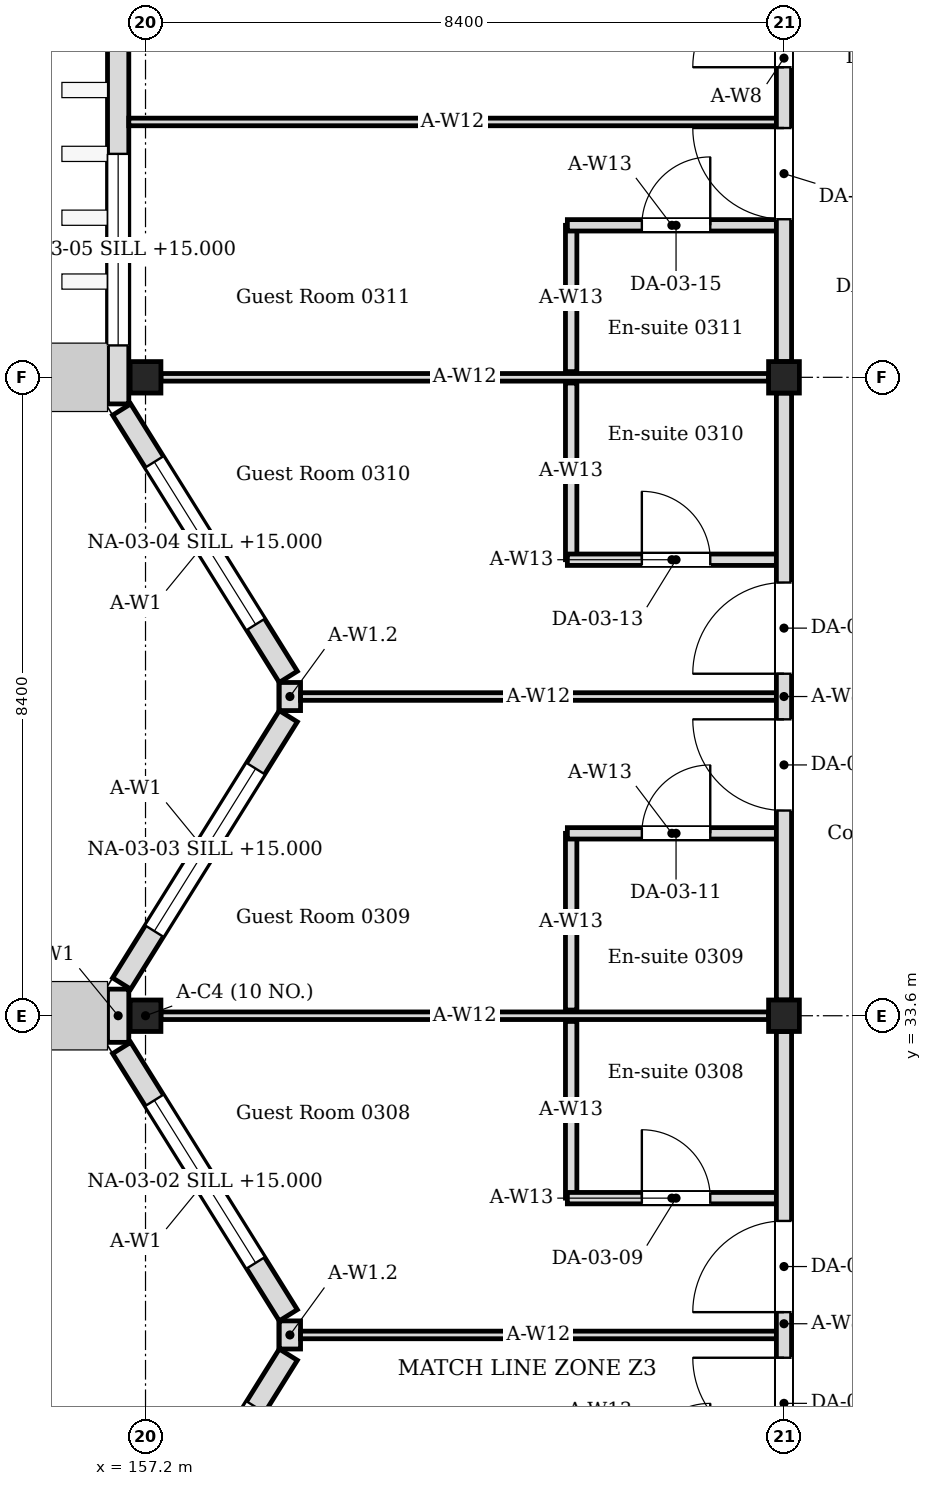
"""IFC4 building model, lengths in metres.
Left out: names, types, materials, properties, quantities, classifications, styles, units other than length and angle.
Written with IfcOpenShell. Run it as: python <this file> out.ifc"""

import sys

from ifc_helpers import new_model, si_unit, direction, frame, frame_2d, origin, origin_2d, place, context, subcontext, project, spatial, rectangle, i_section, extrude, element, fill, save


model = new_model("IFC4")
c1 = context("Model", 3, precision=1e-05, world=origin(), true_north=direction((0.0, 1.0)))
c2 = subcontext(c1, "Body", "Model", "MODEL_VIEW")
j1 = project(units=[si_unit("LENGTHUNIT", "METRE"), si_unit("PLANEANGLEUNIT", "RADIAN")], contexts=[c1])
p1 = place(None, origin())
s1 = spatial("IfcSite", under=j1, at=p1, CompositionType="ELEMENT")
p2 = place(p1, origin())
s2 = spatial("IfcBuilding", under=s1, at=p2, CompositionType="ELEMENT")
p3 = place(p2, frame((0.0, 0.0, 14.4)))
s3 = spatial("IfcBuildingStorey", under=s2, at=p3, CompositionType="ELEMENT", Elevation=14.4)
for number, where, z_axis, x_axis in (
    (1, (157.2, 33.6, 0.0), (0.0, 0.0, 1.0), (1.0, 0.0, 0.0)),
    (2, (157.2, 42.0, 0.0), (0.0, 0.0, 1.0), (1.0, 0.0, 0.0)),
    (3, (165.6, 33.6, 0.0), (0.0, 0.0, 1.0), (1.0, 0.0, 0.0)),
    (4, (165.6, 42.0, 0.0), (0.0, 0.0, 1.0), (1.0, 0.0, 0.0)),
):
    element("IfcColumn", number, at=place(p3, frame(where, z_axis=z_axis, x_axis=x_axis)), inside=s3, PredefinedType="COLUMN", context=c2, shape_type="SweptSolid", body=[
        extrude(i_section(OverallWidth=0.405, OverallDepth=0.414, WebThickness=0.018, FlangeThickness=0.028, FilletRadius=0.022, at=origin_2d()), origin(), (0.0, 0.0, 1.0), 4.2),
    ])
p4 = place(p3, frame((156.886, 25.624, 0.0), z_axis=(0.0, 0.0, 1.0), x_axis=(0.528992500338, 0.848626498871, 0.0)))
e5 = element("IfcWall", 5, at=p4, inside=s3, PredefinedType="SOLIDWALL", context=c2, shape_type="SweptSolid", body=[
    extrude(rectangle(XDim=4.145, YDim=0.28, at=frame_2d((2.072, 0.0))), origin(), (0.0, 0.0, 1.0), 4.05),
])
p5 = place(p4, frame((0.812, 0.0, 0.6)))
e6 = element("IfcOpeningElement", 6, at=p5, cuts=e5, PredefinedType="OPENING", context=c2, shape_type="SweptSolid", body=[
    extrude(rectangle(XDim=2.52, YDim=2.4, at=frame_2d((1.26, 1.2))), frame((0.0, 0.15, 0.0), z_axis=(0.0, -1.0, 0.0), x_axis=(1.0, 0.0, 0.0)), (0.0, 0.0, 1.0), 0.3),
])
p6 = place(p3, frame((159.079, 29.659, 0.0), z_axis=(0.0, 0.0, 1.0), x_axis=(-0.529018946142, 0.848610013271, 0.0)))
e7 = element("IfcWall", 7, at=p6, inside=s3, PredefinedType="SOLIDWALL", context=c2, shape_type="SweptSolid", body=[
    extrude(rectangle(XDim=4.144, YDim=0.28, at=frame_2d((2.072, 0.0))), origin(), (0.0, 0.0, 1.0), 4.05),
])
p7 = place(p6, frame((0.812, 0.0, 0.6)))
e8 = element("IfcOpeningElement", 8, at=p7, cuts=e7, PredefinedType="OPENING", context=c2, shape_type="SweptSolid", body=[
    extrude(rectangle(XDim=2.52, YDim=2.4, at=frame_2d((1.26, 1.2))), frame((0.0, 0.15, 0.0), z_axis=(0.0, -1.0, 0.0), x_axis=(1.0, 0.0, 0.0)), (0.0, 0.0, 1.0), 0.3),
])
p8 = place(p3, frame((159.1, 29.215, 0.0), z_axis=(0.0, 0.0, 1.0), x_axis=(0.0, 1.0, 0.0)))
e9 = element("IfcWall", 9, at=p8, inside=s3, PredefinedType="SOLIDWALL", context=c2, shape_type="SweptSolid", body=[
    extrude(rectangle(XDim=0.37, YDim=0.28, at=frame_2d((0.185, 0.0))), origin(), (0.0, 0.0, 1.0), 3.604),
])
p9 = place(p3, frame((156.84, 33.25, 0.0), z_axis=(0.0, 0.0, 1.0), x_axis=(0.0, 1.0, 0.0)))
e10 = element("IfcWall", 10, at=p9, inside=s3, PredefinedType="SOLIDWALL", context=c2, shape_type="SweptSolid", body=[
    extrude(rectangle(XDim=0.7, YDim=0.28, at=frame_2d((0.35, 0.0))), origin(), (0.0, 0.0, 1.0), 4.05),
])
p10 = place(p3, frame((156.886, 34.024, 0.0), z_axis=(0.0, 0.0, 1.0), x_axis=(0.529018946142, 0.848610013271, 0.0)))
e11 = element("IfcWall", 11, at=p10, inside=s3, PredefinedType="SOLIDWALL", context=c2, shape_type="SweptSolid", body=[
    extrude(rectangle(XDim=4.144, YDim=0.28, at=frame_2d((2.072, 0.0))), origin(), (0.0, 0.0, 1.0), 4.05),
])
p11 = place(p10, frame((0.812, 0.0, 0.6)))
e12 = element("IfcOpeningElement", 12, at=p11, cuts=e11, PredefinedType="OPENING", context=c2, shape_type="SweptSolid", body=[
    extrude(rectangle(XDim=2.52, YDim=2.4, at=frame_2d((1.26, 1.2))), frame((0.0, 0.15, 0.0), z_axis=(0.0, -1.0, 0.0), x_axis=(1.0, 0.0, 0.0)), (0.0, 0.0, 1.0), 0.3),
])
p12 = place(p3, frame((159.079, 38.059, 0.0), z_axis=(0.0, 0.0, 1.0), x_axis=(-0.529018946142, 0.848610013271, 0.0)))
e13 = element("IfcWall", 13, at=p12, inside=s3, PredefinedType="SOLIDWALL", context=c2, shape_type="SweptSolid", body=[
    extrude(rectangle(XDim=4.144, YDim=0.28, at=frame_2d((2.072, 0.0))), origin(), (0.0, 0.0, 1.0), 4.05),
])
p13 = place(p12, frame((0.812, 0.0, 0.6)))
e14 = element("IfcOpeningElement", 14, at=p13, cuts=e13, PredefinedType="OPENING", context=c2, shape_type="SweptSolid", body=[
    extrude(rectangle(XDim=2.52, YDim=2.4, at=frame_2d((1.26, 1.2))), frame((0.0, 0.15, 0.0), z_axis=(0.0, -1.0, 0.0), x_axis=(1.0, 0.0, 0.0)), (0.0, 0.0, 1.0), 0.3),
])
p14 = place(p3, frame((159.1, 37.615, 0.0), z_axis=(0.0, 0.0, 1.0), x_axis=(0.0, 1.0, 0.0)))
e15 = element("IfcWall", 15, at=p14, inside=s3, PredefinedType="SOLIDWALL", context=c2, shape_type="SweptSolid", body=[
    extrude(rectangle(XDim=0.37, YDim=0.28, at=frame_2d((0.185, 0.0))), origin(), (0.0, 0.0, 1.0), 3.604),
])
p15 = place(p3, frame((156.84, 41.65, 0.0), z_axis=(0.0, 0.0, 1.0), x_axis=(0.0, 1.0, 0.0)))
e16 = element("IfcWall", 16, at=p15, inside=s3, PredefinedType="SOLIDWALL", context=c2, shape_type="SweptSolid", body=[
    extrude(rectangle(XDim=17.5, YDim=0.28, at=frame_2d((8.75, 0.0))), origin(), (0.0, 0.0, 1.0), 4.05),
])
p16 = place(p15, frame((0.77, 0.0, 0.6)))
e17 = element("IfcOpeningElement", 17, at=p16, cuts=e16, PredefinedType="OPENING", context=c2, shape_type="SweptSolid", body=[
    extrude(rectangle(XDim=2.52, YDim=2.4, at=frame_2d((1.26, 1.2))), frame((0.0, 0.15, 0.0), z_axis=(0.0, -1.0, 0.0), x_axis=(1.0, 0.0, 0.0)), (0.0, 0.0, 1.0), 0.3),
])
p17 = place(p15, frame((4.97, 0.0, 0.6)))
e18 = element("IfcOpeningElement", 18, at=p17, cuts=e16, PredefinedType="OPENING", context=c2, shape_type="SweptSolid", body=[
    extrude(rectangle(XDim=2.52, YDim=2.4, at=frame_2d((1.26, 1.2))), frame((0.0, 0.15, 0.0), z_axis=(0.0, -1.0, 0.0), x_axis=(1.0, 0.0, 0.0)), (0.0, 0.0, 1.0), 0.3),
])
p18 = place(p15, frame((9.59, 0.0, 0.6)))
e19 = element("IfcOpeningElement", 19, at=p18, cuts=e16, PredefinedType="OPENING", context=c2, shape_type="SweptSolid", body=[
    extrude(rectangle(XDim=2.52, YDim=2.4, at=frame_2d((1.26, 1.2))), frame((0.0, 0.15, 0.0), z_axis=(0.0, -1.0, 0.0), x_axis=(1.0, 0.0, 0.0)), (0.0, 0.0, 1.0), 0.3),
])
p19 = place(p15, frame((13.79, 0.0, 0.6)))
e20 = element("IfcOpeningElement", 20, at=p19, cuts=e16, PredefinedType="OPENING", context=c2, shape_type="SweptSolid", body=[
    extrude(rectangle(XDim=2.52, YDim=2.4, at=frame_2d((1.26, 1.2))), frame((0.0, 0.15, 0.0), z_axis=(0.0, -1.0, 0.0), x_axis=(1.0, 0.0, 0.0)), (0.0, 0.0, 1.0), 0.3),
])
p20 = place(p3, frame((162.8, 31.2, 0.0), z_axis=(0.0, 0.0, 1.0), x_axis=(0.0, 1.0, 0.0)))
e21 = element("IfcWall", 21, at=p20, inside=s3, PredefinedType="PARTITIONING", context=c2, shape_type="SweptSolid", body=[
    extrude(rectangle(XDim=2.325, YDim=0.15, at=frame_2d((1.163, 0.0))), origin(), (0.0, 0.0, 1.0), 4.05),
])
p21 = place(p3, frame((162.75, 31.2, 0.0), z_axis=(0.0, 0.0, 1.0), x_axis=(1.0, 0.0, 0.0)))
e22 = element("IfcWall", 22, at=p21, inside=s3, PredefinedType="PARTITIONING", context=c2, shape_type="SweptSolid", body=[
    extrude(rectangle(XDim=2.75, YDim=0.15, at=frame_2d((1.375, 0.0))), origin(), (0.0, 0.0, 1.0), 4.05),
])
p22 = place(p21, frame((0.98, 0.0, 0.0)))
e23 = element("IfcOpeningElement", 23, at=p22, cuts=e22, PredefinedType="OPENING", context=c2, shape_type="SweptSolid", body=[
    extrude(rectangle(XDim=0.9, YDim=2.1, at=frame_2d((0.45, 1.05))), frame((0.0, 0.085, 0.0), z_axis=(0.0, -1.0, 0.0), x_axis=(1.0, 0.0, 0.0)), (0.0, 0.0, 1.0), 0.17),
])
p23 = place(p3, frame((162.8, 33.675, 0.0), z_axis=(0.0, 0.0, 1.0), x_axis=(0.0, 1.0, 0.0)))
e24 = element("IfcWall", 24, at=p23, inside=s3, PredefinedType="PARTITIONING", context=c2, shape_type="SweptSolid", body=[
    extrude(rectangle(XDim=2.325, YDim=0.15, at=frame_2d((1.163, 0.0))), origin(), (0.0, 0.0, 1.0), 4.05),
])
p24 = place(p3, frame((162.75, 36.0, 0.0), z_axis=(0.0, 0.0, 1.0), x_axis=(1.0, 0.0, 0.0)))
e25 = element("IfcWall", 25, at=p24, inside=s3, PredefinedType="PARTITIONING", context=c2, shape_type="SweptSolid", body=[
    extrude(rectangle(XDim=2.75, YDim=0.15, at=frame_2d((1.375, 0.0))), origin(), (0.0, 0.0, 1.0), 4.05),
])
p25 = place(p24, frame((0.98, 0.0, 0.0)))
e26 = element("IfcOpeningElement", 26, at=p25, cuts=e25, PredefinedType="OPENING", context=c2, shape_type="SweptSolid", body=[
    extrude(rectangle(XDim=0.9, YDim=2.1, at=frame_2d((0.45, 1.05))), frame((0.0, 0.085, 0.0), z_axis=(0.0, -1.0, 0.0), x_axis=(1.0, 0.0, 0.0)), (0.0, 0.0, 1.0), 0.17),
])
p26 = place(p3, frame((162.8, 39.6, 0.0), z_axis=(0.0, 0.0, 1.0), x_axis=(0.0, 1.0, 0.0)))
e27 = element("IfcWall", 27, at=p26, inside=s3, PredefinedType="PARTITIONING", context=c2, shape_type="SweptSolid", body=[
    extrude(rectangle(XDim=2.325, YDim=0.15, at=frame_2d((1.163, 0.0))), origin(), (0.0, 0.0, 1.0), 4.05),
])
p27 = place(p3, frame((162.75, 39.6, 0.0), z_axis=(0.0, 0.0, 1.0), x_axis=(1.0, 0.0, 0.0)))
e28 = element("IfcWall", 28, at=p27, inside=s3, PredefinedType="PARTITIONING", context=c2, shape_type="SweptSolid", body=[
    extrude(rectangle(XDim=2.75, YDim=0.15, at=frame_2d((1.375, 0.0))), origin(), (0.0, 0.0, 1.0), 4.05),
])
p28 = place(p27, frame((0.98, 0.0, 0.0)))
e29 = element("IfcOpeningElement", 29, at=p28, cuts=e28, PredefinedType="OPENING", context=c2, shape_type="SweptSolid", body=[
    extrude(rectangle(XDim=0.9, YDim=2.1, at=frame_2d((0.45, 1.05))), frame((0.0, 0.085, 0.0), z_axis=(0.0, -1.0, 0.0), x_axis=(1.0, 0.0, 0.0)), (0.0, 0.0, 1.0), 0.17),
])
p29 = place(p3, frame((162.8, 42.075, 0.0), z_axis=(0.0, 0.0, 1.0), x_axis=(0.0, 1.0, 0.0)))
e30 = element("IfcWall", 30, at=p29, inside=s3, PredefinedType="PARTITIONING", context=c2, shape_type="SweptSolid", body=[
    extrude(rectangle(XDim=1.925, YDim=0.15, at=frame_2d((0.962, 0.0))), origin(), (0.0, 0.0, 1.0), 4.05),
])
p30 = place(p3, frame((162.75, 44.0, 0.0), z_axis=(0.0, 0.0, 1.0), x_axis=(1.0, 0.0, 0.0)))
e31 = element("IfcWall", 31, at=p30, inside=s3, PredefinedType="PARTITIONING", context=c2, shape_type="SweptSolid", body=[
    extrude(rectangle(XDim=2.75, YDim=0.15, at=frame_2d((1.375, 0.0))), origin(), (0.0, 0.0, 1.0), 4.05),
])
p31 = place(p30, frame((0.98, 0.0, 0.0)))
e32 = element("IfcOpeningElement", 32, at=p31, cuts=e31, PredefinedType="OPENING", context=c2, shape_type="SweptSolid", body=[
    extrude(rectangle(XDim=0.9, YDim=2.1, at=frame_2d((0.45, 1.05))), frame((0.0, 0.085, 0.0), z_axis=(0.0, -1.0, 0.0), x_axis=(1.0, 0.0, 0.0)), (0.0, 0.0, 1.0), 0.17),
])
for number, where, z_axis, x_axis in (
    (33, (157.403, 33.6, 0.0), (0.0, 0.0, 1.0), (1.0, 0.0, 0.0)),
    (34, (157.403, 42.0, 0.0), (0.0, 0.0, 1.0), (1.0, 0.0, 0.0)),
):
    element("IfcWall", number, at=place(p3, frame(where, z_axis=z_axis, x_axis=x_axis)), inside=s3, PredefinedType="PARTITIONING", context=c2, shape_type="SweptSolid", body=[
        extrude(rectangle(XDim=7.995, YDim=0.1, at=frame_2d((3.998, 0.0))), origin(), (0.0, 0.0, 1.0), 3.604),
    ])
for number, where, z_axis, x_axis in (
    (35, (159.24, 29.4, 0.0), (0.0, 0.0, 1.0), (1.0, 0.0, 0.0)),
    (36, (159.24, 37.8, 0.0), (0.0, 0.0, 1.0), (1.0, 0.0, 0.0)),
):
    element("IfcWall", number, at=place(p3, frame(where, z_axis=z_axis, x_axis=x_axis)), inside=s3, PredefinedType="PARTITIONING", context=c2, shape_type="SweptSolid", body=[
        extrude(rectangle(XDim=6.26, YDim=0.1, at=frame_2d((3.13, 0.0))), origin(), (0.0, 0.0, 1.0), 3.604),
    ])
p32 = place(p3, frame((156.98, 45.36, 0.0), z_axis=(0.0, 0.0, 1.0), x_axis=(1.0, 0.0, 0.0)))
e37 = element("IfcWall", 37, at=p32, inside=s3, PredefinedType="PARTITIONING", context=c2, shape_type="SweptSolid", body=[
    extrude(rectangle(XDim=8.52, YDim=0.1, at=frame_2d((4.26, 0.0))), origin(), (0.0, 0.0, 1.0), 3.604),
])
p33 = place(p3, frame((165.6, 25.407, 0.0), z_axis=(0.0, 0.0, 1.0), x_axis=(0.0, 1.0, 0.0)))
e38 = element("IfcWall", 38, at=p33, inside=s3, PredefinedType="PARTITIONING", context=c2, shape_type="SweptSolid", body=[
    extrude(rectangle(XDim=7.986, YDim=0.2, at=frame_2d((3.993, 0.0))), origin(), (0.0, 0.0, 1.0), 3.45),
])
p34 = place(p33, frame((2.493, 0.0, 0.0)))
e39 = element("IfcOpeningElement", 39, at=p34, cuts=e38, PredefinedType="OPENING", context=c2, shape_type="SweptSolid", body=[
    extrude(rectangle(XDim=1.2, YDim=2.1, at=frame_2d((0.6, 1.05))), frame((0.0, 0.11, 0.0), z_axis=(0.0, -1.0, 0.0), x_axis=(1.0, 0.0, 0.0)), (0.0, 0.0, 1.0), 0.22),
])
p35 = place(p33, frame((4.293, 0.0, 0.0)))
e40 = element("IfcOpeningElement", 40, at=p35, cuts=e38, PredefinedType="OPENING", context=c2, shape_type="SweptSolid", body=[
    extrude(rectangle(XDim=1.2, YDim=2.1, at=frame_2d((0.6, 1.05))), frame((0.0, 0.11, 0.0), z_axis=(0.0, -1.0, 0.0), x_axis=(1.0, 0.0, 0.0)), (0.0, 0.0, 1.0), 0.22),
])
p36 = place(p3, frame((165.6, 33.807, 0.0), z_axis=(0.0, 0.0, 1.0), x_axis=(0.0, 1.0, 0.0)))
e41 = element("IfcWall", 41, at=p36, inside=s3, PredefinedType="PARTITIONING", context=c2, shape_type="SweptSolid", body=[
    extrude(rectangle(XDim=7.986, YDim=0.2, at=frame_2d((3.993, 0.0))), origin(), (0.0, 0.0, 1.0), 3.45),
])
p37 = place(p36, frame((2.493, 0.0, 0.0)))
e42 = element("IfcOpeningElement", 42, at=p37, cuts=e41, PredefinedType="OPENING", context=c2, shape_type="SweptSolid", body=[
    extrude(rectangle(XDim=1.2, YDim=2.1, at=frame_2d((0.6, 1.05))), frame((0.0, 0.11, 0.0), z_axis=(0.0, -1.0, 0.0), x_axis=(1.0, 0.0, 0.0)), (0.0, 0.0, 1.0), 0.22),
])
p38 = place(p36, frame((4.293, 0.0, 0.0)))
e43 = element("IfcOpeningElement", 43, at=p38, cuts=e41, PredefinedType="OPENING", context=c2, shape_type="SweptSolid", body=[
    extrude(rectangle(XDim=1.2, YDim=2.1, at=frame_2d((0.6, 1.05))), frame((0.0, 0.11, 0.0), z_axis=(0.0, -1.0, 0.0), x_axis=(1.0, 0.0, 0.0)), (0.0, 0.0, 1.0), 0.22),
])
p39 = place(p3, frame((165.6, 42.207, 0.0), z_axis=(0.0, 0.0, 1.0), x_axis=(0.0, 1.0, 0.0)))
e44 = element("IfcWall", 44, at=p39, inside=s3, PredefinedType="PARTITIONING", context=c2, shape_type="SweptSolid", body=[
    extrude(rectangle(XDim=7.986, YDim=0.2, at=frame_2d((3.993, 0.0))), origin(), (0.0, 0.0, 1.0), 3.45),
])
p40 = place(p39, frame((1.873, 0.0, 0.0)))
e45 = element("IfcOpeningElement", 45, at=p40, cuts=e44, PredefinedType="OPENING", context=c2, shape_type="SweptSolid", body=[
    extrude(rectangle(XDim=1.2, YDim=2.1, at=frame_2d((0.6, 1.05))), frame((0.0, 0.11, 0.0), z_axis=(0.0, -1.0, 0.0), x_axis=(1.0, 0.0, 0.0)), (0.0, 0.0, 1.0), 0.22),
])
p41 = place(p39, frame((3.873, 0.0, 0.0)))
e46 = element("IfcOpeningElement", 46, at=p41, cuts=e44, PredefinedType="OPENING", context=c2, shape_type="SweptSolid", body=[
    extrude(rectangle(XDim=1.2, YDim=2.1, at=frame_2d((0.6, 1.05))), frame((0.0, 0.11, 0.0), z_axis=(0.0, -1.0, 0.0), x_axis=(1.0, 0.0, 0.0)), (0.0, 0.0, 1.0), 0.22),
])
p42 = place(p7, origin())
e47 = element("IfcWindow", 47, at=p42, inside=s3, PartitioningType="SINGLE_PANEL", PredefinedType="WINDOW", context=c2, shape_type="SweptSolid", body=[
    extrude(rectangle(XDim=2.52, YDim=2.4, at=frame_2d((1.26, 1.2))), frame((0.0, 0.03, 0.0), z_axis=(0.0, -1.0, 0.0), x_axis=(1.0, 0.0, 0.0)), (0.0, 0.0, 1.0), 0.06),
])
fill(e8, e47)
p43 = place(p11, origin())
e48 = element("IfcWindow", 48, at=p43, inside=s3, PartitioningType="SINGLE_PANEL", PredefinedType="WINDOW", context=c2, shape_type="SweptSolid", body=[
    extrude(rectangle(XDim=2.52, YDim=2.4, at=frame_2d((1.26, 1.2))), frame((0.0, 0.03, 0.0), z_axis=(0.0, -1.0, 0.0), x_axis=(1.0, 0.0, 0.0)), (0.0, 0.0, 1.0), 0.06),
])
fill(e12, e48)
p44 = place(p13, origin())
e49 = element("IfcWindow", 49, at=p44, inside=s3, PartitioningType="SINGLE_PANEL", PredefinedType="WINDOW", context=c2, shape_type="SweptSolid", body=[
    extrude(rectangle(XDim=2.52, YDim=2.4, at=frame_2d((1.26, 1.2))), frame((0.0, 0.03, 0.0), z_axis=(0.0, -1.0, 0.0), x_axis=(1.0, 0.0, 0.0)), (0.0, 0.0, 1.0), 0.06),
])
fill(e14, e49)
p45 = place(p16, origin())
e50 = element("IfcWindow", 50, at=p45, inside=s3, PartitioningType="SINGLE_PANEL", PredefinedType="WINDOW", context=c2, shape_type="SweptSolid", body=[
    extrude(rectangle(XDim=2.52, YDim=2.4, at=frame_2d((1.26, 1.2))), frame((0.0, 0.03, 0.0), z_axis=(0.0, -1.0, 0.0), x_axis=(1.0, 0.0, 0.0)), (0.0, 0.0, 1.0), 0.06),
])
fill(e17, e50)
p46 = place(p34, origin())
e51 = element("IfcDoor", 51, at=p46, inside=s3, OperationType="SINGLE_SWING_RIGHT", PredefinedType="DOOR", context=c2, shape_type="SweptSolid", body=[
    extrude(rectangle(XDim=1.2, YDim=2.1, at=frame_2d((0.6, 1.05))), frame((0.0, 0.025, 0.0), z_axis=(0.0, -1.0, 0.0), x_axis=(1.0, 0.0, 0.0)), (0.0, 0.0, 1.0), 0.05),
])
fill(e39, e51)
p47 = place(p22, origin())
e52 = element("IfcDoor", 52, at=p47, inside=s3, OperationType="SINGLE_SWING_LEFT", PredefinedType="DOOR", context=c2, shape_type="SweptSolid", body=[
    extrude(rectangle(XDim=0.9, YDim=2.1, at=frame_2d((0.45, 1.05))), frame((0.0, 0.025, 0.0), z_axis=(0.0, -1.0, 0.0), x_axis=(1.0, 0.0, 0.0)), (0.0, 0.0, 1.0), 0.05),
])
fill(e23, e52)
p48 = place(p35, origin())
e53 = element("IfcDoor", 53, at=p48, inside=s3, OperationType="SINGLE_SWING_LEFT", PredefinedType="DOOR", context=c2, shape_type="SweptSolid", body=[
    extrude(rectangle(XDim=1.2, YDim=2.1, at=frame_2d((0.6, 1.05))), frame((0.0, 0.025, 0.0), z_axis=(0.0, -1.0, 0.0), x_axis=(1.0, 0.0, 0.0)), (0.0, 0.0, 1.0), 0.05),
])
fill(e40, e53)
p49 = place(p25, origin())
e54 = element("IfcDoor", 54, at=p49, inside=s3, OperationType="SINGLE_SWING_RIGHT", PredefinedType="DOOR", context=c2, shape_type="SweptSolid", body=[
    extrude(rectangle(XDim=0.9, YDim=2.1, at=frame_2d((0.45, 1.05))), frame((0.0, 0.025, 0.0), z_axis=(0.0, -1.0, 0.0), x_axis=(1.0, 0.0, 0.0)), (0.0, 0.0, 1.0), 0.05),
])
fill(e26, e54)
p50 = place(p37, origin())
e55 = element("IfcDoor", 55, at=p50, inside=s3, OperationType="SINGLE_SWING_RIGHT", PredefinedType="DOOR", context=c2, shape_type="SweptSolid", body=[
    extrude(rectangle(XDim=1.2, YDim=2.1, at=frame_2d((0.6, 1.05))), frame((0.0, 0.025, 0.0), z_axis=(0.0, -1.0, 0.0), x_axis=(1.0, 0.0, 0.0)), (0.0, 0.0, 1.0), 0.05),
])
fill(e42, e55)
p51 = place(p28, origin())
e56 = element("IfcDoor", 56, at=p51, inside=s3, OperationType="SINGLE_SWING_LEFT", PredefinedType="DOOR", context=c2, shape_type="SweptSolid", body=[
    extrude(rectangle(XDim=0.9, YDim=2.1, at=frame_2d((0.45, 1.05))), frame((0.0, 0.025, 0.0), z_axis=(0.0, -1.0, 0.0), x_axis=(1.0, 0.0, 0.0)), (0.0, 0.0, 1.0), 0.05),
])
fill(e29, e56)
p52 = place(p38, origin())
e57 = element("IfcDoor", 57, at=p52, inside=s3, OperationType="SINGLE_SWING_LEFT", PredefinedType="DOOR", context=c2, shape_type="SweptSolid", body=[
    extrude(rectangle(XDim=1.2, YDim=2.1, at=frame_2d((0.6, 1.05))), frame((0.0, 0.025, 0.0), z_axis=(0.0, -1.0, 0.0), x_axis=(1.0, 0.0, 0.0)), (0.0, 0.0, 1.0), 0.05),
])
fill(e43, e57)
p53 = place(p31, origin())
e58 = element("IfcDoor", 58, at=p53, inside=s3, OperationType="SINGLE_SWING_RIGHT", PredefinedType="DOOR", context=c2, shape_type="SweptSolid", body=[
    extrude(rectangle(XDim=0.9, YDim=2.1, at=frame_2d((0.45, 1.05))), frame((0.0, 0.025, 0.0), z_axis=(0.0, -1.0, 0.0), x_axis=(1.0, 0.0, 0.0)), (0.0, 0.0, 1.0), 0.05),
])
fill(e32, e58)
p54 = place(p40, origin())
e59 = element("IfcDoor", 59, at=p54, inside=s3, OperationType="SINGLE_SWING_RIGHT", PredefinedType="DOOR", context=c2, shape_type="SweptSolid", body=[
    extrude(rectangle(XDim=1.2, YDim=2.1, at=frame_2d((0.6, 1.05))), frame((0.0, 0.025, 0.0), z_axis=(0.0, -1.0, 0.0), x_axis=(1.0, 0.0, 0.0)), (0.0, 0.0, 1.0), 0.05),
])
fill(e45, e59)
p55 = place(p41, origin())
e60 = element("IfcDoor", 60, at=p55, inside=s3, OperationType="SINGLE_SWING_LEFT", PredefinedType="DOOR", context=c2, shape_type="SweptSolid", body=[
    extrude(rectangle(XDim=1.2, YDim=2.1, at=frame_2d((0.6, 1.05))), frame((0.0, 0.025, 0.0), z_axis=(0.0, -1.0, 0.0), x_axis=(1.0, 0.0, 0.0)), (0.0, 0.0, 1.0), 0.05),
])
fill(e46, e60)
save(model, sys.argv[1])
